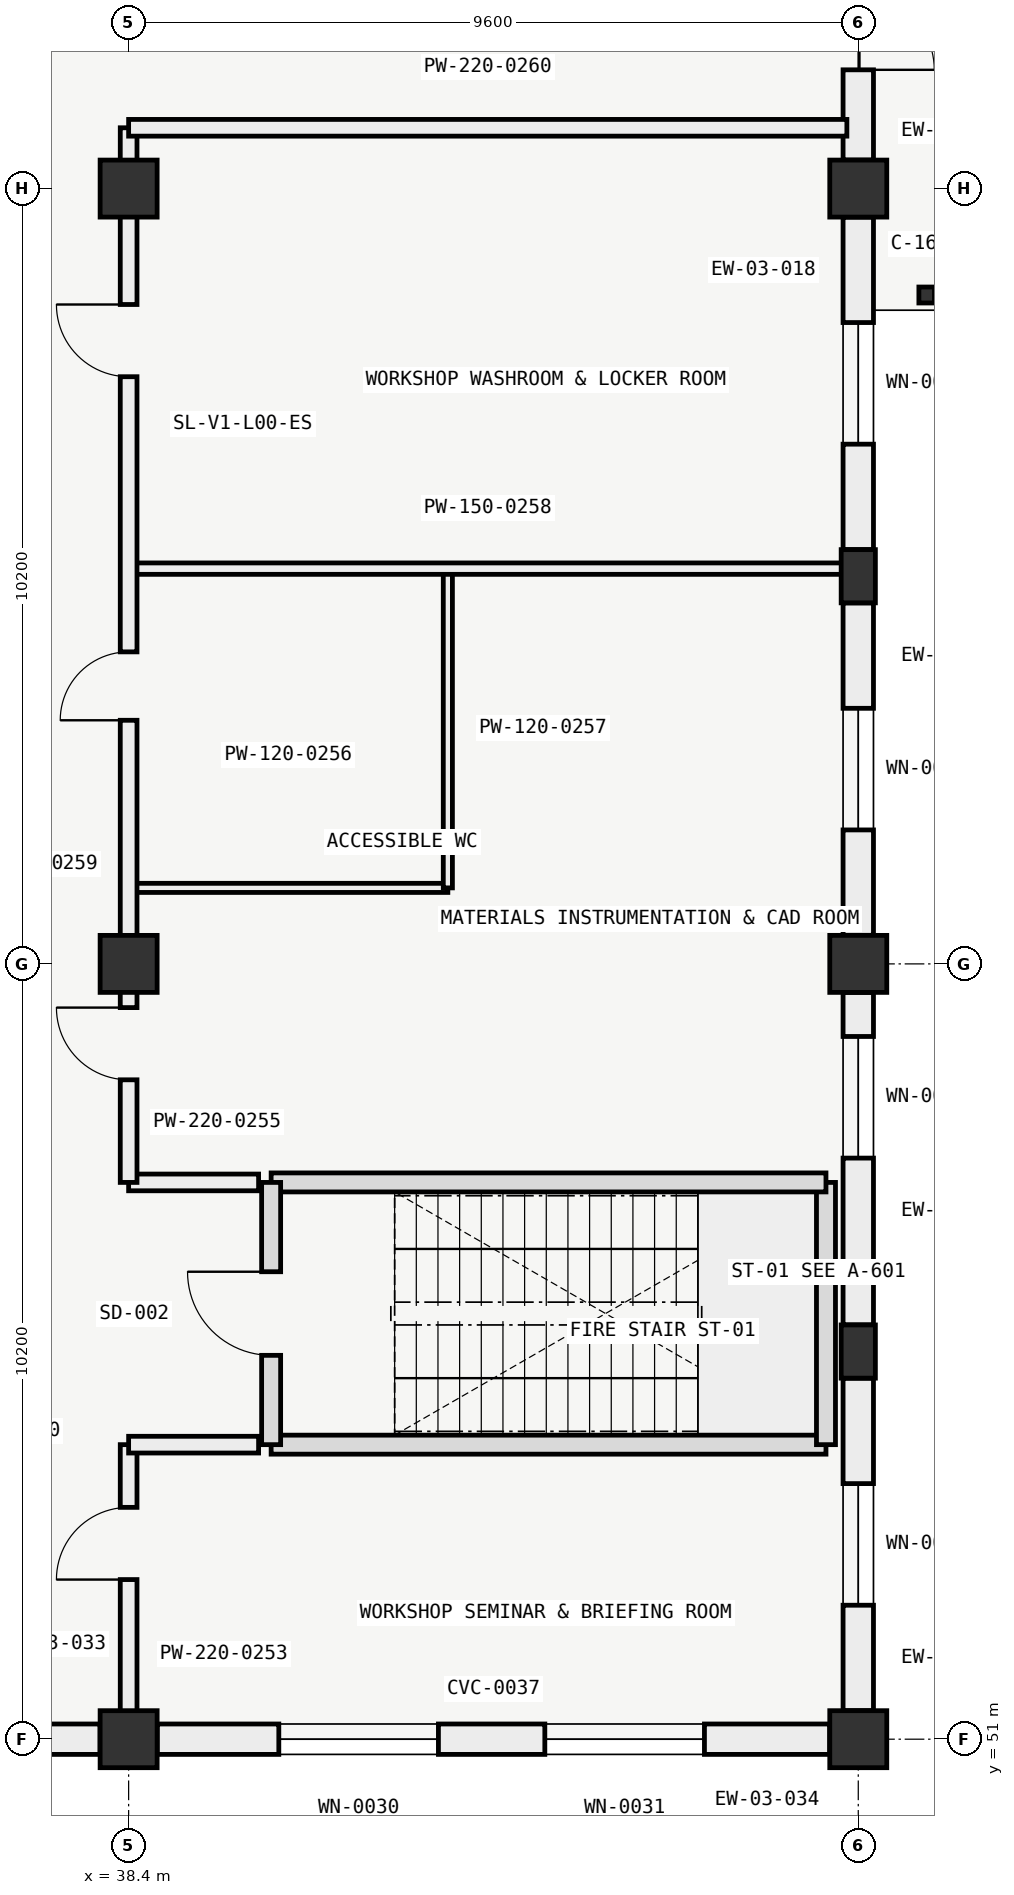
"""IFC4 building model, lengths in metres.
Left out: names, types, materials, properties, quantities, classifications, styles, units other than length and angle.
Written with IfcOpenShell. Run it as: python <this file> out.ifc"""

import sys

from ifc_helpers import new_model, si_unit, direction, frame, frame_2d, origin, origin_2d, place, context, subcontext, project, spatial, rectangle, i_section, extrude, element, fill, save


model = new_model("IFC4")
c1 = context("Model", 3, precision=1e-05, world=origin(), true_north=direction((0.0, 1.0)))
c2 = subcontext(c1, "Body", "Model", "MODEL_VIEW")
j1 = project(units=[si_unit("LENGTHUNIT", "METRE"), si_unit("PLANEANGLEUNIT", "RADIAN")], contexts=[c1])
p1 = place(None, origin())
s1 = spatial("IfcSite", under=j1, at=p1, CompositionType="ELEMENT")
p2 = place(p1, origin())
s2 = spatial("IfcBuilding", under=s1, at=p2, CompositionType="ELEMENT")
p3 = place(p2, origin())
s3 = spatial("IfcBuildingStorey", under=s2, at=p3, CompositionType="ELEMENT", Elevation=0.0)
for number, where, z_axis, x_axis in (
    (1, (38.4, 51.0, 0.0), (0.0, 0.0, 1.0), (1.0, 0.0, 0.0)),
    (2, (48.0, 51.0, 0.0), (0.0, 0.0, 1.0), (1.0, 0.0, 0.0)),
    (3, (38.4, 61.2, 0.0), (0.0, 0.0, 1.0), (1.0, 0.0, 0.0)),
    (4, (48.0, 61.2, 0.0), (0.0, 0.0, 1.0), (1.0, 0.0, 0.0)),
    (5, (38.4, 71.4, 0.0), (0.0, 0.0, 1.0), (1.0, 0.0, 0.0)),
    (6, (48.0, 71.4, 0.0), (0.0, 0.0, 1.0), (1.0, 0.0, 0.0)),
):
    element("IfcColumn", number, at=place(p3, frame(where, z_axis=z_axis, x_axis=x_axis)), inside=s3, PredefinedType="COLUMN", context=c2, shape_type="SweptSolid", body=[
        extrude(rectangle(XDim=0.75, YDim=0.75, at=origin_2d()), origin(), (0.0, 0.0, 1.0), 5.4),
    ])
for number, where, z_axis, x_axis in (
    (7, (48.0, 56.1, 0.0), (0.0, 0.0, 1.0), (1.0, 0.0, 0.0)),
    (8, (48.0, 66.3, 0.0), (0.0, 0.0, 1.0), (1.0, 0.0, 0.0)),
):
    element("IfcColumn", number, at=place(p3, frame(where, z_axis=z_axis, x_axis=x_axis)), inside=s3, PredefinedType="PILASTER", context=c2, shape_type="SweptSolid", body=[
        extrude(rectangle(XDim=0.45, YDim=0.7, at=origin_2d()), origin(), (0.0, 0.0, 1.0), 5.4),
    ])
p4 = place(p3, frame((48.9, 70.0, -1.02), z_axis=(0.0, 0.0, 1.0), x_axis=(1.0, 0.0, 0.0)))
e9 = element("IfcColumn", 9, at=p4, inside=s3, PredefinedType="COLUMN", context=c2, shape_type="SweptSolid", body=[
    extrude(i_section(OverallWidth=0.205, OverallDepth=0.21, WebThickness=0.009, FlangeThickness=0.014, FilletRadius=0.011, at=origin_2d()), origin(), (0.0, 0.0, 1.0), 6.37),
])
p5 = place(p3, frame((48.0, 55.749, 0.0), z_axis=(0.0, 0.0, 1.0), x_axis=(0.0, -1.0, 0.0)))
e10 = element("IfcWall", 10, at=p5, inside=s3, PredefinedType="SOLIDWALL", context=c2, shape_type="SweptSolid", body=[
    extrude(rectangle(XDim=4.373, YDim=0.4, at=frame_2d((2.187, 0.0))), origin(), (0.0, 0.0, 1.0), 4.45),
])
p6 = place(p5, frame((1.386, 0.0, 0.95)))
e11 = element("IfcOpeningElement", 11, at=p6, cuts=e10, PredefinedType="OPENING", context=c2, shape_type="SweptSolid", body=[
    extrude(rectangle(XDim=1.6, YDim=1.9, at=frame_2d((0.8, 0.95))), frame((0.0, 0.21, 0.0), z_axis=(0.0, -1.0, 0.0), x_axis=(1.0, 0.0, 0.0)), (0.0, 0.0, 1.0), 0.42),
])
p7 = place(p3, frame((48.0, 60.824, 0.0), z_axis=(0.0, 0.0, 1.0), x_axis=(0.0, -1.0, 0.0)))
e12 = element("IfcWall", 12, at=p7, inside=s3, PredefinedType="SOLIDWALL", context=c2, shape_type="SweptSolid", body=[
    extrude(rectangle(XDim=4.373, YDim=0.4, at=frame_2d((2.187, 0.0))), origin(), (0.0, 0.0, 1.0), 4.45),
])
p8 = place(p7, frame((0.579, 0.0, 0.95)))
e13 = element("IfcOpeningElement", 13, at=p8, cuts=e12, PredefinedType="OPENING", context=c2, shape_type="SweptSolid", body=[
    extrude(rectangle(XDim=1.6, YDim=1.9, at=frame_2d((0.8, 0.95))), frame((0.0, 0.21, 0.0), z_axis=(0.0, -1.0, 0.0), x_axis=(1.0, 0.0, 0.0)), (0.0, 0.0, 1.0), 0.42),
])
p9 = place(p3, frame((48.0, 65.949, 0.0), z_axis=(0.0, 0.0, 1.0), x_axis=(0.0, -1.0, 0.0)))
e14 = element("IfcWall", 14, at=p9, inside=s3, PredefinedType="SOLIDWALL", context=c2, shape_type="SweptSolid", body=[
    extrude(rectangle(XDim=4.373, YDim=0.4, at=frame_2d((2.187, 0.0))), origin(), (0.0, 0.0, 1.0), 4.45),
])
p10 = place(p9, frame((1.386, 0.0, 0.95)))
e15 = element("IfcOpeningElement", 15, at=p10, cuts=e14, PredefinedType="OPENING", context=c2, shape_type="SweptSolid", body=[
    extrude(rectangle(XDim=1.6, YDim=1.9, at=frame_2d((0.8, 0.95))), frame((0.0, 0.21, 0.0), z_axis=(0.0, -1.0, 0.0), x_axis=(1.0, 0.0, 0.0)), (0.0, 0.0, 1.0), 0.42),
])
p11 = place(p3, frame((48.0, 71.024, 0.0), z_axis=(0.0, 0.0, 1.0), x_axis=(0.0, -1.0, 0.0)))
e16 = element("IfcWall", 16, at=p11, inside=s3, PredefinedType="SOLIDWALL", context=c2, shape_type="SweptSolid", body=[
    extrude(rectangle(XDim=4.373, YDim=0.4, at=frame_2d((2.187, 0.0))), origin(), (0.0, 0.0, 1.0), 4.45),
])
p12 = place(p11, frame((1.386, 0.0, 0.95)))
e17 = element("IfcOpeningElement", 17, at=p12, cuts=e16, PredefinedType="OPENING", context=c2, shape_type="SweptSolid", body=[
    extrude(rectangle(XDim=1.6, YDim=1.9, at=frame_2d((0.8, 0.95))), frame((0.0, 0.21, 0.0), z_axis=(0.0, -1.0, 0.0), x_axis=(1.0, 0.0, 0.0)), (0.0, 0.0, 1.0), 0.42),
])
p13 = place(p3, frame((48.0, 76.149, 0.0), z_axis=(0.0, 0.0, 1.0), x_axis=(0.0, -1.0, 0.0)))
e18 = element("IfcWall", 18, at=p13, inside=s3, PredefinedType="SOLIDWALL", context=c2, shape_type="SweptSolid", body=[
    extrude(rectangle(XDim=4.373, YDim=0.4, at=frame_2d((2.187, 0.0))), origin(), (0.0, 0.0, 1.0), 4.45),
])
p14 = place(p13, frame((1.187, 0.0, 0.0)))
e19 = element("IfcOpeningElement", 19, at=p14, cuts=e18, PredefinedType="OPENING", context=c2, shape_type="SweptSolid", body=[
    extrude(rectangle(XDim=2.0, YDim=2.4, at=frame_2d((1.0, 1.2))), frame((0.0, 0.21, 0.0), z_axis=(0.0, -1.0, 0.0), x_axis=(1.0, 0.0, 0.0)), (0.0, 0.0, 1.0), 0.42),
])
p15 = place(p3, frame((38.024, 51.0, 0.0), z_axis=(0.0, 0.0, 1.0), x_axis=(-1.0, 0.0, 0.0)))
e20 = element("IfcWall", 20, at=p15, inside=s3, PredefinedType="SOLIDWALL", context=c2, shape_type="SweptSolid", body=[
    extrude(rectangle(XDim=2.624, YDim=0.4, at=frame_2d((1.312, 0.0))), origin(), (0.0, 0.0, 1.0), 4.493),
])
p16 = place(p15, frame((0.762, 0.0, 0.0)))
e21 = element("IfcOpeningElement", 21, at=p16, cuts=e20, PredefinedType="OPENING", context=c2, shape_type="SweptSolid", body=[
    extrude(rectangle(XDim=1.1, YDim=2.2, at=frame_2d((0.55, 1.1))), frame((0.0, 0.21, 0.0), z_axis=(0.0, -1.0, 0.0), x_axis=(1.0, 0.0, 0.0)), (0.0, 0.0, 1.0), 0.42),
])
p17 = place(p3, frame((47.624, 51.0, 0.0), z_axis=(0.0, 0.0, 1.0), x_axis=(-1.0, 0.0, 0.0)))
e22 = element("IfcWall", 22, at=p17, inside=s3, PredefinedType="SOLIDWALL", context=c2, shape_type="SweptSolid", body=[
    extrude(rectangle(XDim=8.848, YDim=0.4, at=frame_2d((4.424, 0.0))), origin(), (0.0, 0.0, 1.0), 4.5),
])
p18 = place(p17, frame((5.148, 0.0, 0.85)))
e23 = element("IfcOpeningElement", 23, at=p18, cuts=e22, PredefinedType="OPENING", context=c2, shape_type="SweptSolid", body=[
    extrude(rectangle(XDim=2.1, YDim=2.4, at=frame_2d((1.05, 1.2))), frame((0.0, 0.21, 0.0), z_axis=(0.0, -1.0, 0.0), x_axis=(1.0, 0.0, 0.0)), (0.0, 0.0, 1.0), 0.42),
])
p19 = place(p17, frame((1.648, 0.0, 0.85)))
e24 = element("IfcOpeningElement", 24, at=p19, cuts=e22, PredefinedType="OPENING", context=c2, shape_type="SweptSolid", body=[
    extrude(rectangle(XDim=2.1, YDim=2.4, at=frame_2d((1.05, 1.2))), frame((0.0, 0.21, 0.0), z_axis=(0.0, -1.0, 0.0), x_axis=(1.0, 0.0, 0.0)), (0.0, 0.0, 1.0), 0.42),
])
p20 = place(p3, frame((40.275, 54.875, 0.0), z_axis=(0.0, 0.0, 1.0), x_axis=(1.0, 0.0, 0.0)))
e25 = element("IfcWall", 25, at=p20, inside=s3, PredefinedType="SOLIDWALL", context=c2, shape_type="SweptSolid", body=[
    extrude(rectangle(XDim=7.3, YDim=0.25, at=frame_2d((3.65, 0.0))), origin(), (0.0, 0.0, 1.0), 5.12),
])
p21 = place(p3, frame((47.575, 54.875, 0.0), z_axis=(0.0, 0.0, 1.0), x_axis=(0.0, 1.0, 0.0)))
e26 = element("IfcWall", 26, at=p21, inside=s3, PredefinedType="SOLIDWALL", context=c2, shape_type="SweptSolid", body=[
    extrude(rectangle(XDim=3.45, YDim=0.25, at=frame_2d((1.725, 0.0))), origin(), (0.0, 0.0, 1.0), 5.12),
])
p22 = place(p3, frame((47.575, 58.325, 0.0), z_axis=(0.0, 0.0, 1.0), x_axis=(-1.0, 0.0, 0.0)))
e27 = element("IfcWall", 27, at=p22, inside=s3, PredefinedType="SOLIDWALL", context=c2, shape_type="SweptSolid", body=[
    extrude(rectangle(XDim=7.3, YDim=0.25, at=frame_2d((3.65, 0.0))), origin(), (0.0, 0.0, 1.0), 5.12),
])
p23 = place(p3, frame((40.275, 54.875, 0.0), z_axis=(0.0, 0.0, 1.0), x_axis=(0.0, 1.0, 0.0)))
e28 = element("IfcWall", 28, at=p23, inside=s3, PredefinedType="SOLIDWALL", context=c2, shape_type="SweptSolid", body=[
    extrude(rectangle(XDim=3.45, YDim=0.25, at=frame_2d((1.725, 0.0))), origin(), (0.0, 0.0, 1.0), 5.12),
])
p24 = place(p23, frame((1.175, 0.0, 0.0)))
e29 = element("IfcOpeningElement", 29, at=p24, cuts=e28, PredefinedType="OPENING", context=c2, shape_type="SweptSolid", body=[
    extrude(rectangle(XDim=1.1, YDim=2.2, at=frame_2d((0.55, 1.1))), frame((0.0, 0.135, 0.0), z_axis=(0.0, -1.0, 0.0), x_axis=(1.0, 0.0, 0.0)), (0.0, 0.0, 1.0), 0.27),
])
p25 = place(p3, frame((38.4, 51.15, 0.0), z_axis=(0.0, 0.0, 1.0), x_axis=(0.0, 1.0, 0.0)))
e30 = element("IfcWall", 30, at=p25, inside=s3, PredefinedType="PARTITIONING", context=c2, shape_type="SweptSolid", body=[
    extrude(rectangle(XDim=3.725, YDim=0.22, at=frame_2d((1.863, 0.0))), origin(), (0.0, 0.0, 1.0), 4.643),
])
p26 = place(p25, frame((1.95, 0.0, 0.0)))
e31 = element("IfcOpeningElement", 31, at=p26, cuts=e30, PredefinedType="OPENING", context=c2, shape_type="SweptSolid", body=[
    extrude(rectangle(XDim=0.95, YDim=2.1, at=frame_2d((0.475, 1.05))), frame((0.0, 0.12, 0.0), z_axis=(0.0, -1.0, 0.0), x_axis=(1.0, 0.0, 0.0)), (0.0, 0.0, 1.0), 0.24),
])
for number, where, z_axis, x_axis in (
    (32, (38.4, 54.875, 0.0), (0.0, 0.0, 1.0), (1.0, 0.0, 0.0)),
    (33, (38.4, 58.325, 0.0), (0.0, 0.0, 1.0), (1.0, 0.0, 0.0)),
):
    element("IfcWall", number, at=place(p3, frame(where, z_axis=z_axis, x_axis=x_axis)), inside=s3, PredefinedType="PARTITIONING", context=c2, shape_type="SweptSolid", body=[
        extrude(rectangle(XDim=1.71, YDim=0.22, at=frame_2d((0.855, 0.0))), origin(), (0.0, 0.0, 1.0), 4.643),
    ])
p27 = place(p3, frame((38.4, 62.2, 0.0), z_axis=(0.0, 0.0, 1.0), x_axis=(1.0, 0.0, 0.0)))
e34 = element("IfcWall", 34, at=p27, inside=s3, PredefinedType="PARTITIONING", context=c2, shape_type="SweptSolid", body=[
    extrude(rectangle(XDim=4.2, YDim=0.12, at=frame_2d((2.1, 0.0))), origin(), (0.0, 0.0, 1.0), 4.643),
])
p28 = place(p3, frame((42.6, 62.2, 0.0), z_axis=(0.0, 0.0, 1.0), x_axis=(0.0, 1.0, 0.0)))
e35 = element("IfcWall", 35, at=p28, inside=s3, PredefinedType="PARTITIONING", context=c2, shape_type="SweptSolid", body=[
    extrude(rectangle(XDim=4.2, YDim=0.12, at=frame_2d((2.1, 0.0))), origin(), (0.0, 0.0, 1.0), 4.848),
])
p29 = place(p3, frame((38.4, 66.4, 0.0), z_axis=(0.0, 0.0, 1.0), x_axis=(1.0, 0.0, 0.0)))
e36 = element("IfcWall", 36, at=p29, inside=s3, PredefinedType="PARTITIONING", context=c2, shape_type="SweptSolid", body=[
    extrude(rectangle(XDim=9.45, YDim=0.15, at=frame_2d((4.725, 0.0))), origin(), (0.0, 0.0, 1.0), 4.643),
])
p30 = place(p3, frame((38.4, 58.325, 0.0), z_axis=(0.0, 0.0, 1.0), x_axis=(0.0, 1.0, 0.0)))
e37 = element("IfcWall", 37, at=p30, inside=s3, PredefinedType="PARTITIONING", context=c2, shape_type="SweptSolid", body=[
    extrude(rectangle(XDim=13.875, YDim=0.22, at=frame_2d((6.938, 0.0))), origin(), (0.0, 0.0, 1.0), 4.493),
])
p31 = place(p30, frame((1.35, 0.0, 0.0)))
e38 = element("IfcOpeningElement", 38, at=p31, cuts=e37, PredefinedType="OPENING", context=c2, shape_type="SweptSolid", body=[
    extrude(rectangle(XDim=0.95, YDim=2.1, at=frame_2d((0.475, 1.05))), frame((0.0, 0.12, 0.0), z_axis=(0.0, -1.0, 0.0), x_axis=(1.0, 0.0, 0.0)), (0.0, 0.0, 1.0), 0.24),
])
p32 = place(p30, frame((6.08, 0.0, 0.0)))
e39 = element("IfcOpeningElement", 39, at=p32, cuts=e37, PredefinedType="OPENING", context=c2, shape_type="SweptSolid", body=[
    extrude(rectangle(XDim=0.9, YDim=2.05, at=frame_2d((0.45, 1.025))), frame((0.0, 0.12, 0.0), z_axis=(0.0, -1.0, 0.0), x_axis=(1.0, 0.0, 0.0)), (0.0, 0.0, 1.0), 0.24),
])
p33 = place(p30, frame((10.6, 0.0, 0.0)))
e40 = element("IfcOpeningElement", 40, at=p33, cuts=e37, PredefinedType="OPENING", context=c2, shape_type="SweptSolid", body=[
    extrude(rectangle(XDim=0.95, YDim=2.1, at=frame_2d((0.475, 1.05))), frame((0.0, 0.12, 0.0), z_axis=(0.0, -1.0, 0.0), x_axis=(1.0, 0.0, 0.0)), (0.0, 0.0, 1.0), 0.24),
])
p34 = place(p3, frame((38.4, 72.2, 0.0), z_axis=(0.0, 0.0, 1.0), x_axis=(1.0, 0.0, 0.0)))
e41 = element("IfcWall", 41, at=p34, inside=s3, PredefinedType="PARTITIONING", context=c2, shape_type="SweptSolid", body=[
    extrude(rectangle(XDim=9.45, YDim=0.22, at=frame_2d((4.725, 0.0))), origin(), (0.0, 0.0, 1.0), 4.45),
])
p35 = place(p6, origin())
e42 = element("IfcWindow", 42, at=p35, inside=s3, PartitioningType="SINGLE_PANEL", PredefinedType="WINDOW", context=c2, shape_type="SweptSolid", body=[
    extrude(rectangle(XDim=1.6, YDim=1.9, at=frame_2d((0.8, 0.95))), frame((0.0, 0.03, 0.0), z_axis=(0.0, -1.0, 0.0), x_axis=(1.0, 0.0, 0.0)), (0.0, 0.0, 1.0), 0.06),
])
fill(e11, e42)
p36 = place(p8, origin())
e43 = element("IfcWindow", 43, at=p36, inside=s3, PartitioningType="SINGLE_PANEL", PredefinedType="WINDOW", context=c2, shape_type="SweptSolid", body=[
    extrude(rectangle(XDim=1.6, YDim=1.9, at=frame_2d((0.8, 0.95))), frame((0.0, 0.03, 0.0), z_axis=(0.0, -1.0, 0.0), x_axis=(1.0, 0.0, 0.0)), (0.0, 0.0, 1.0), 0.06),
])
fill(e13, e43)
p37 = place(p10, origin())
e44 = element("IfcWindow", 44, at=p37, inside=s3, PartitioningType="SINGLE_PANEL", PredefinedType="WINDOW", context=c2, shape_type="SweptSolid", body=[
    extrude(rectangle(XDim=1.6, YDim=1.9, at=frame_2d((0.8, 0.95))), frame((0.0, 0.03, 0.0), z_axis=(0.0, -1.0, 0.0), x_axis=(1.0, 0.0, 0.0)), (0.0, 0.0, 1.0), 0.06),
])
fill(e15, e44)
p38 = place(p12, origin())
e45 = element("IfcWindow", 45, at=p38, inside=s3, PartitioningType="SINGLE_PANEL", PredefinedType="WINDOW", context=c2, shape_type="SweptSolid", body=[
    extrude(rectangle(XDim=1.6, YDim=1.9, at=frame_2d((0.8, 0.95))), frame((0.0, 0.03, 0.0), z_axis=(0.0, -1.0, 0.0), x_axis=(1.0, 0.0, 0.0)), (0.0, 0.0, 1.0), 0.06),
])
fill(e17, e45)
p39 = place(p14, origin())
e46 = element("IfcDoor", 46, at=p39, inside=s3, OperationType="DOUBLE_DOOR_SINGLE_SWING", PredefinedType="DOOR", context=c2, shape_type="SweptSolid", body=[
    extrude(rectangle(XDim=2.0, YDim=2.4, at=frame_2d((1.0, 1.2))), frame((0.0, 0.025, 0.0), z_axis=(0.0, -1.0, 0.0), x_axis=(1.0, 0.0, 0.0)), (0.0, 0.0, 1.0), 0.05),
])
fill(e19, e46)
p40 = place(p18, origin())
e47 = element("IfcWindow", 47, at=p40, inside=s3, PartitioningType="SINGLE_PANEL", PredefinedType="WINDOW", context=c2, shape_type="SweptSolid", body=[
    extrude(rectangle(XDim=2.1, YDim=2.4, at=frame_2d((1.05, 1.2))), frame((0.0, 0.03, 0.0), z_axis=(0.0, -1.0, 0.0), x_axis=(1.0, 0.0, 0.0)), (0.0, 0.0, 1.0), 0.06),
])
fill(e23, e47)
p41 = place(p19, origin())
e48 = element("IfcWindow", 48, at=p41, inside=s3, PartitioningType="SINGLE_PANEL", PredefinedType="WINDOW", context=c2, shape_type="SweptSolid", body=[
    extrude(rectangle(XDim=2.1, YDim=2.4, at=frame_2d((1.05, 1.2))), frame((0.0, 0.03, 0.0), z_axis=(0.0, -1.0, 0.0), x_axis=(1.0, 0.0, 0.0)), (0.0, 0.0, 1.0), 0.06),
])
fill(e24, e48)
p42 = place(p24, origin())
e49 = element("IfcDoor", 49, at=p42, inside=s3, OperationType="SINGLE_SWING_RIGHT", PredefinedType="DOOR", context=c2, shape_type="SweptSolid", body=[
    extrude(rectangle(XDim=1.1, YDim=2.2, at=frame_2d((0.55, 1.1))), frame((0.0, 0.025, 0.0), z_axis=(0.0, -1.0, 0.0), x_axis=(1.0, 0.0, 0.0)), (0.0, 0.0, 1.0), 0.05),
])
fill(e29, e49)
p43 = place(p26, origin())
e50 = element("IfcDoor", 50, at=p43, inside=s3, OperationType="SINGLE_SWING_LEFT", PredefinedType="DOOR", context=c2, shape_type="SweptSolid", body=[
    extrude(rectangle(XDim=0.95, YDim=2.1, at=frame_2d((0.475, 1.05))), frame((0.0, 0.025, 0.0), z_axis=(0.0, -1.0, 0.0), x_axis=(1.0, 0.0, 0.0)), (0.0, 0.0, 1.0), 0.05),
])
fill(e31, e50)
p44 = place(p31, origin())
e51 = element("IfcDoor", 51, at=p44, inside=s3, OperationType="SINGLE_SWING_RIGHT", PredefinedType="DOOR", context=c2, shape_type="SweptSolid", body=[
    extrude(rectangle(XDim=0.95, YDim=2.1, at=frame_2d((0.475, 1.05))), frame((0.0, 0.025, 0.0), z_axis=(0.0, -1.0, 0.0), x_axis=(1.0, 0.0, 0.0)), (0.0, 0.0, 1.0), 0.05),
])
fill(e38, e51)
p45 = place(p32, origin())
e52 = element("IfcDoor", 52, at=p45, inside=s3, OperationType="SINGLE_SWING_LEFT", PredefinedType="DOOR", context=c2, shape_type="SweptSolid", body=[
    extrude(rectangle(XDim=0.9, YDim=2.05, at=frame_2d((0.45, 1.025))), frame((0.0, 0.025, 0.0), z_axis=(0.0, -1.0, 0.0), x_axis=(1.0, 0.0, 0.0)), (0.0, 0.0, 1.0), 0.05),
])
fill(e39, e52)
p46 = place(p33, origin())
e53 = element("IfcDoor", 53, at=p46, inside=s3, OperationType="SINGLE_SWING_RIGHT", PredefinedType="DOOR", context=c2, shape_type="SweptSolid", body=[
    extrude(rectangle(XDim=0.95, YDim=2.1, at=frame_2d((0.475, 1.05))), frame((0.0, 0.025, 0.0), z_axis=(0.0, -1.0, 0.0), x_axis=(1.0, 0.0, 0.0)), (0.0, 0.0, 1.0), 0.05),
])
fill(e40, e53)
save(model, sys.argv[1])
